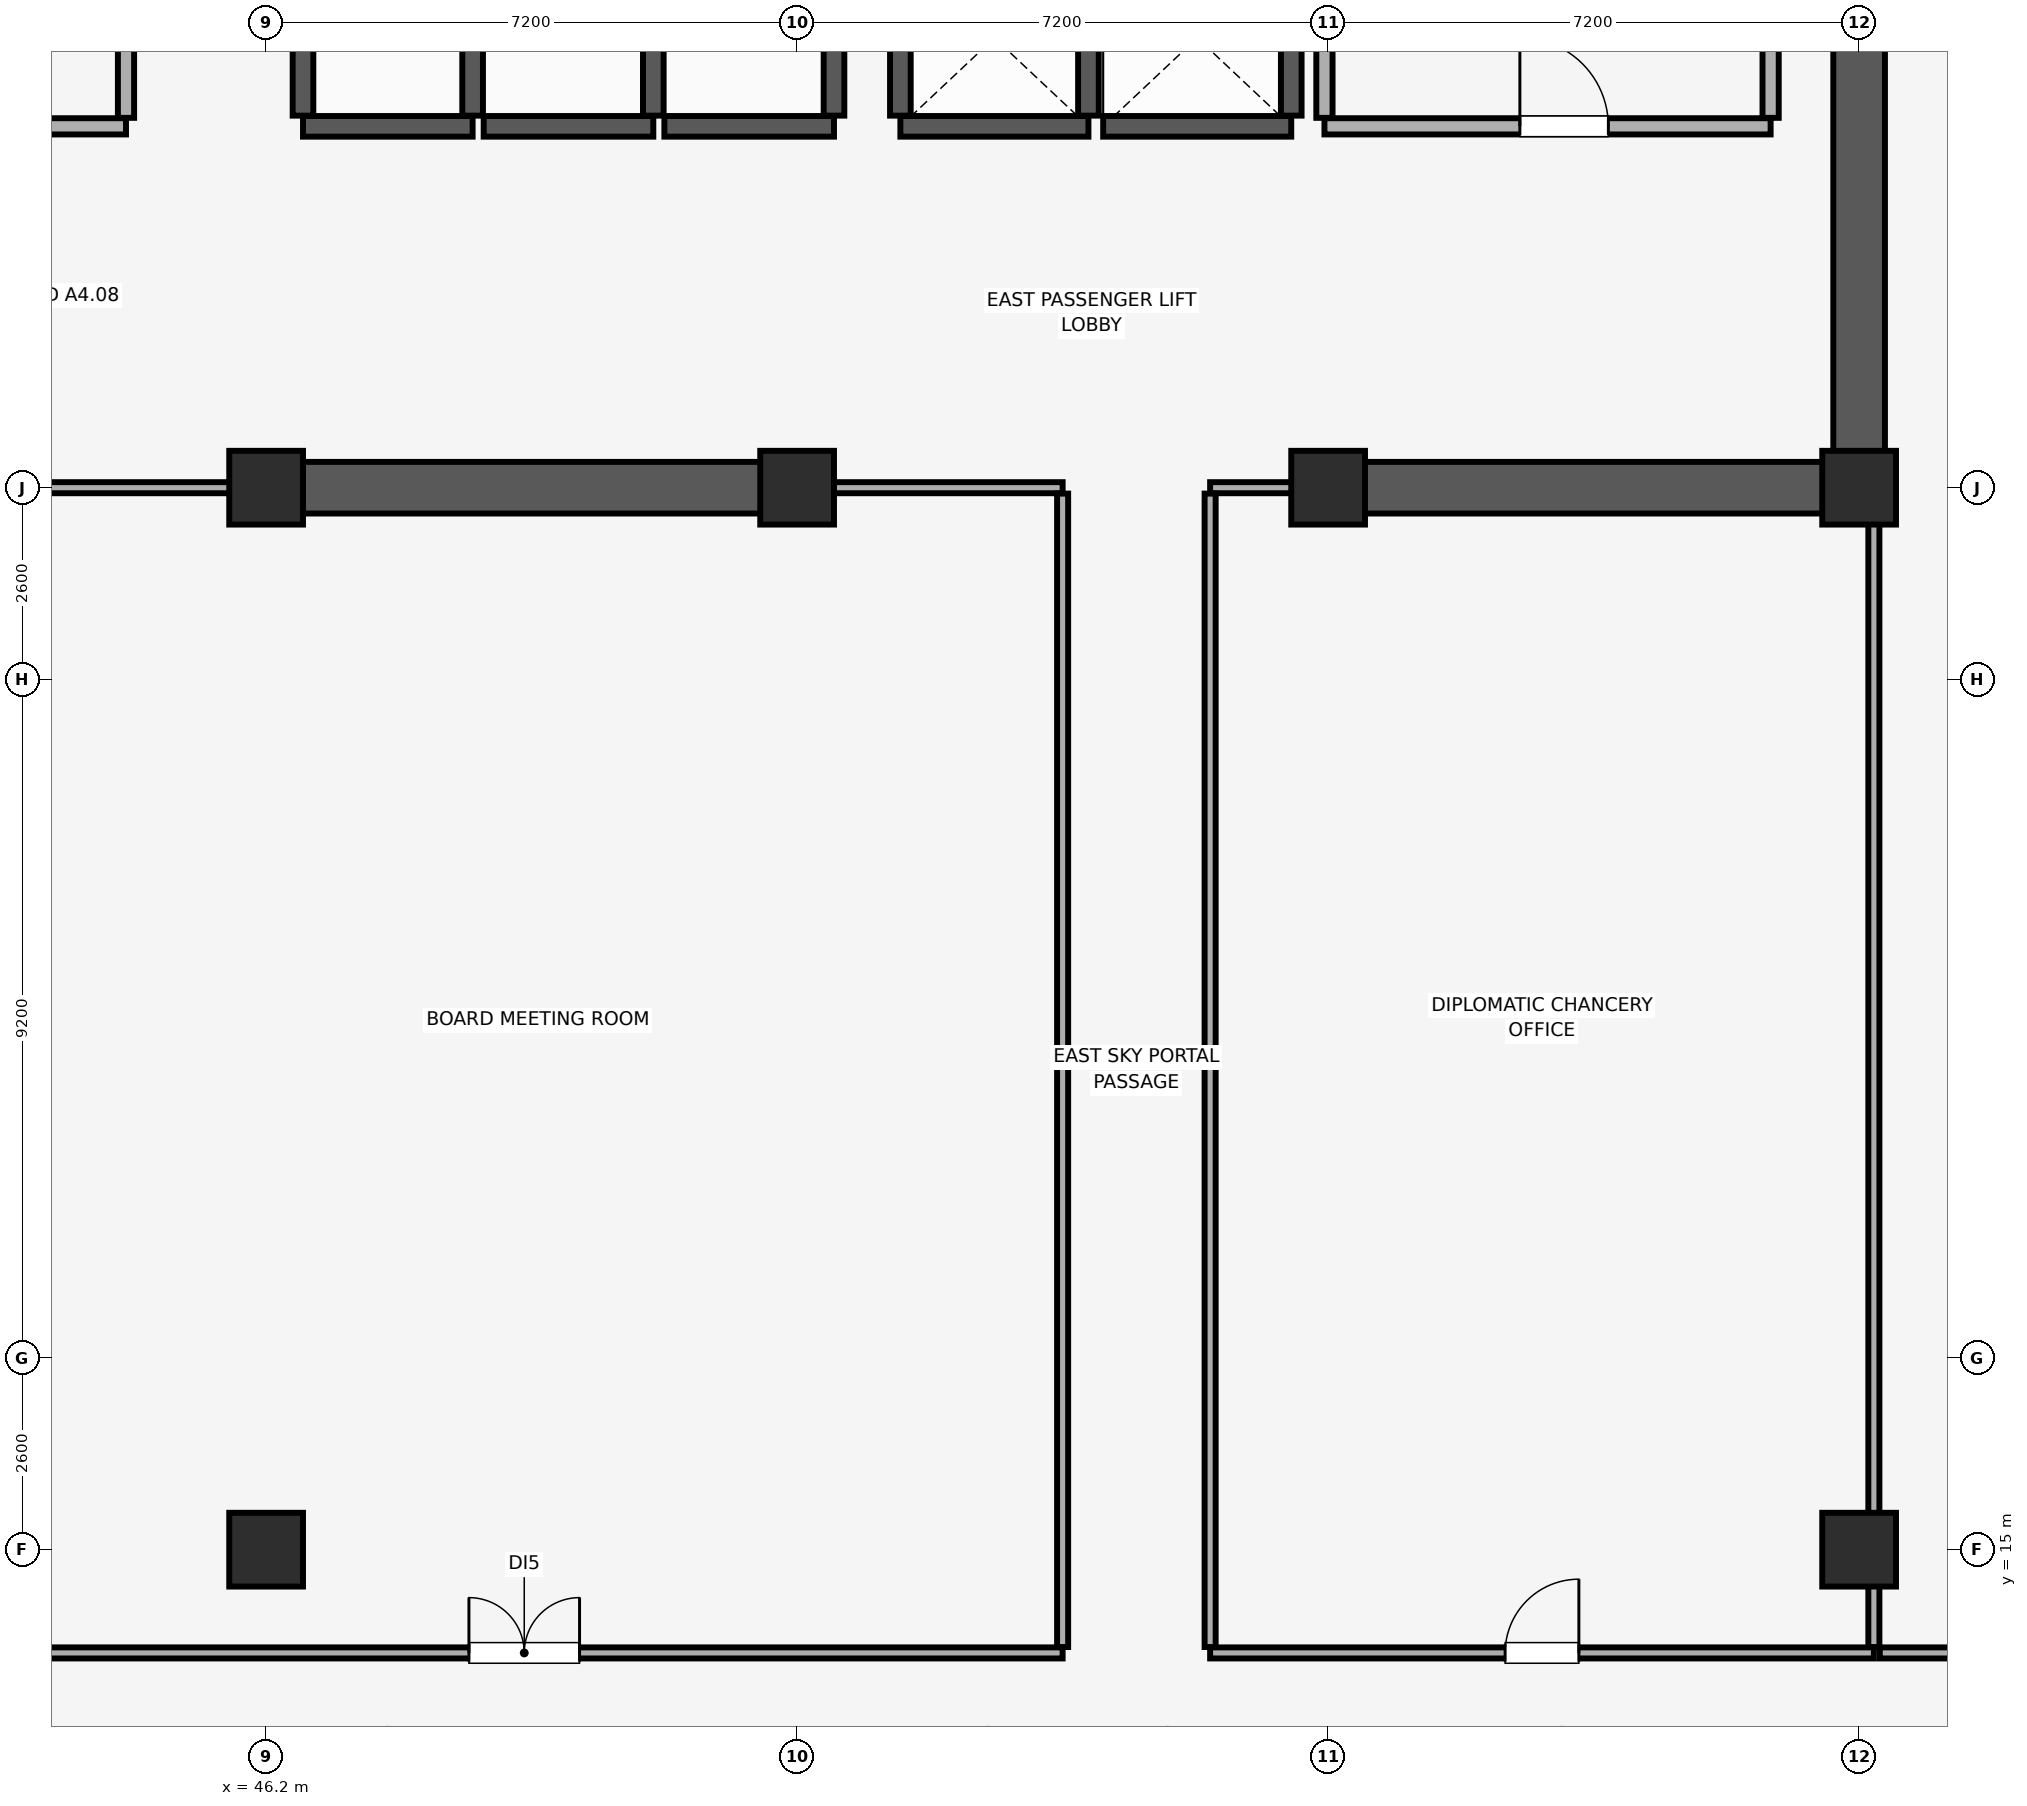
"""IFC4 building model, lengths in metres.
Left out: names, types, materials, properties, quantities, classifications, styles, units other than length and angle.
Written with IfcOpenShell. Run it as: python <this file> out.ifc"""

import sys

from ifc_helpers import new_model, si_unit, direction, frame, frame_2d, origin, origin_2d, place, context, subcontext, project, spatial, rectangle, extrude, element, fill, save


model = new_model("IFC4")
c1 = context("Model", 3, precision=1e-05, world=origin(), true_north=direction((0.0, 1.0)))
c2 = subcontext(c1, "Body", "Model", "MODEL_VIEW")
j1 = project(units=[si_unit("LENGTHUNIT", "METRE"), si_unit("PLANEANGLEUNIT", "RADIAN")], contexts=[c1])
p1 = place(None, origin())
s1 = spatial("IfcSite", under=j1, at=p1, CompositionType="ELEMENT")
p2 = place(p1, origin())
s2 = spatial("IfcBuilding", under=s1, at=p2, CompositionType="ELEMENT")
p3 = place(p2, frame((0.0, 0.0, 229.15)))
s3 = spatial("IfcBuildingStorey", under=s2, at=p3, CompositionType="ELEMENT", Elevation=229.15)
for number, where, z_axis, x_axis in (
    (1, (46.2, 15.0, 0.0), (0.0, 0.0, 1.0), (1.0, 0.0, 0.0)),
    (2, (67.8, 15.0, 0.0), (0.0, 0.0, 1.0), (1.0, 0.0, 0.0)),
    (3, (46.2, 29.4, 0.0), (0.0, 0.0, 1.0), (1.0, 0.0, 0.0)),
    (4, (53.4, 29.4, 0.0), (0.0, 0.0, 1.0), (1.0, 0.0, 0.0)),
    (5, (60.6, 29.4, 0.0), (0.0, 0.0, 1.0), (1.0, 0.0, 0.0)),
    (6, (67.8, 29.4, 0.0), (0.0, 0.0, 1.0), (1.0, 0.0, 0.0)),
):
    element("IfcColumn", number, at=place(p3, frame(where, z_axis=z_axis, x_axis=x_axis)), inside=s3, PredefinedType="COLUMN", context=c2, shape_type="SweptSolid", body=[
        extrude(rectangle(XDim=1.0, YDim=1.0, at=origin_2d()), origin(), (0.0, 0.0, 1.0), 3.71),
    ])
p4 = place(p3, frame((67.8, 29.4, 0.0), z_axis=(0.0, 0.0, 1.0), x_axis=(0.0, 1.0, 0.0)))
e7 = element("IfcWall", 7, at=p4, inside=s3, PredefinedType="SHEAR", context=c2, shape_type="SweptSolid", body=[
    extrude(rectangle(XDim=19.2, YDim=0.7, at=frame_2d((9.6, 0.0))), origin(), (0.0, 0.0, 1.0), 3.71),
])
p5 = place(p3, frame((46.0, 29.4, 0.0), z_axis=(0.0, 0.0, 1.0), x_axis=(1.0, 0.0, 0.0)))
e8 = element("IfcWall", 8, at=p5, inside=s3, PredefinedType="SHEAR", context=c2, shape_type="SweptSolid", body=[
    extrude(rectangle(XDim=7.6, YDim=0.7, at=frame_2d((3.8, 0.0))), origin(), (0.0, 0.0, 1.0), 3.71),
])
p6 = place(p3, frame((60.4, 29.4, 0.0), z_axis=(0.0, 0.0, 1.0), x_axis=(1.0, 0.0, 0.0)))
e9 = element("IfcWall", 9, at=p6, inside=s3, PredefinedType="SHEAR", context=c2, shape_type="SweptSolid", body=[
    extrude(rectangle(XDim=7.045, YDim=0.7, at=frame_2d((3.522, 0.0))), origin(), (0.0, 0.0, 1.0), 3.71),
])
p7 = place(p3, frame((46.7, 34.3, 0.0), z_axis=(0.0, 0.0, 1.0), x_axis=(1.0, 0.0, 0.0)))
e10 = element("IfcWall", 10, at=p7, inside=s3, PredefinedType="SHEAR", context=c2, shape_type="SweptSolid", body=[
    extrude(rectangle(XDim=2.3, YDim=0.28, at=frame_2d((1.15, 0.0))), origin(), (0.0, 0.0, 1.0), 3.71),
])
for number, where, z_axis, x_axis in (
    (11, (46.7, 34.445, 0.0), (0.0, 0.0, 1.0), (0.0, 1.0, 0.0)),
    (12, (49.0, 34.445, 0.0), (0.0, 0.0, 1.0), (0.0, 1.0, 0.0)),
):
    element("IfcWall", number, at=place(p3, frame(where, z_axis=z_axis, x_axis=x_axis)), inside=s3, PredefinedType="SHEAR", context=c2, shape_type="SweptSolid", body=[
        extrude(rectangle(XDim=2.01, YDim=0.28, at=frame_2d((1.005, 0.0))), origin(), (0.0, 0.0, 1.0), 3.71),
    ])
p8 = place(p3, frame((49.15, 34.3, 0.0), z_axis=(0.0, 0.0, 1.0), x_axis=(1.0, 0.0, 0.0)))
e13 = element("IfcWall", 13, at=p8, inside=s3, PredefinedType="SHEAR", context=c2, shape_type="SweptSolid", body=[
    extrude(rectangle(XDim=2.3, YDim=0.28, at=frame_2d((1.15, 0.0))), origin(), (0.0, 0.0, 1.0), 3.71),
])
p9 = place(p3, frame((51.45, 34.445, 0.0), z_axis=(0.0, 0.0, 1.0), x_axis=(0.0, 1.0, 0.0)))
e14 = element("IfcWall", 14, at=p9, inside=s3, PredefinedType="SHEAR", context=c2, shape_type="SweptSolid", body=[
    extrude(rectangle(XDim=2.01, YDim=0.28, at=frame_2d((1.005, 0.0))), origin(), (0.0, 0.0, 1.0), 3.71),
])
p10 = place(p3, frame((51.6, 34.3, 0.0), z_axis=(0.0, 0.0, 1.0), x_axis=(1.0, 0.0, 0.0)))
e15 = element("IfcWall", 15, at=p10, inside=s3, PredefinedType="SHEAR", context=c2, shape_type="SweptSolid", body=[
    extrude(rectangle(XDim=2.3, YDim=0.28, at=frame_2d((1.15, 0.0))), origin(), (0.0, 0.0, 1.0), 3.71),
])
p11 = place(p3, frame((53.9, 34.445, 0.0), z_axis=(0.0, 0.0, 1.0), x_axis=(0.0, 1.0, 0.0)))
e16 = element("IfcWall", 16, at=p11, inside=s3, PredefinedType="SHEAR", context=c2, shape_type="SweptSolid", body=[
    extrude(rectangle(XDim=2.01, YDim=0.28, at=frame_2d((1.005, 0.0))), origin(), (0.0, 0.0, 1.0), 3.71),
])
p12 = place(p3, frame((54.8, 34.3, 0.0), z_axis=(0.0, 0.0, 1.0), x_axis=(1.0, 0.0, 0.0)))
e17 = element("IfcWall", 17, at=p12, inside=s3, PredefinedType="SHEAR", context=c2, shape_type="SweptSolid", body=[
    extrude(rectangle(XDim=2.55, YDim=0.28, at=frame_2d((1.275, 0.0))), origin(), (0.0, 0.0, 1.0), 3.71),
])
for number, where, z_axis, x_axis in (
    (18, (54.8, 34.445, 0.0), (0.0, 0.0, 1.0), (0.0, 1.0, 0.0)),
    (19, (57.35, 34.445, 0.0), (0.0, 0.0, 1.0), (0.0, 1.0, 0.0)),
):
    element("IfcWall", number, at=place(p3, frame(where, z_axis=z_axis, x_axis=x_axis)), inside=s3, PredefinedType="SHEAR", context=c2, shape_type="SweptSolid", body=[
        extrude(rectangle(XDim=2.11, YDim=0.28, at=frame_2d((1.055, 0.0))), origin(), (0.0, 0.0, 1.0), 3.71),
    ])
p13 = place(p3, frame((57.55, 34.3, 0.0), z_axis=(0.0, 0.0, 1.0), x_axis=(1.0, 0.0, 0.0)))
e20 = element("IfcWall", 20, at=p13, inside=s3, PredefinedType="SHEAR", context=c2, shape_type="SweptSolid", body=[
    extrude(rectangle(XDim=2.55, YDim=0.28, at=frame_2d((1.275, 0.0))), origin(), (0.0, 0.0, 1.0), 3.71),
])
p14 = place(p3, frame((60.1, 34.445, 0.0), z_axis=(0.0, 0.0, 1.0), x_axis=(0.0, 1.0, 0.0)))
e21 = element("IfcWall", 21, at=p14, inside=s3, PredefinedType="SHEAR", context=c2, shape_type="SweptSolid", body=[
    extrude(rectangle(XDim=2.11, YDim=0.28, at=frame_2d((1.055, 0.0))), origin(), (0.0, 0.0, 1.0), 3.71),
])
p15 = place(p3, frame((60.55, 34.3, 0.0), z_axis=(0.0, 0.0, 1.0), x_axis=(1.0, 0.0, 0.0)))
e22 = element("IfcWall", 22, at=p15, inside=s3, PredefinedType="PARTITIONING", context=c2, shape_type="SweptSolid", body=[
    extrude(rectangle(XDim=6.05, YDim=0.22, at=frame_2d((3.025, 0.0))), origin(), (0.0, 0.0, 1.0), 3.71),
])
p16 = place(p15, frame((2.65, 0.0, 0.0)))
e23 = element("IfcOpeningElement", 23, at=p16, cuts=e22, PredefinedType="OPENING", context=c2, shape_type="SweptSolid", body=[
    extrude(rectangle(XDim=1.2, YDim=2.15, at=frame_2d((0.6, 1.075))), frame((0.0, 0.12, 0.0), z_axis=(0.0, -1.0, 0.0), x_axis=(1.0, 0.0, 0.0)), (0.0, 0.0, 1.0), 0.24),
])
p17 = place(p3, frame((60.55, 34.415, 0.0), z_axis=(0.0, 0.0, 1.0), x_axis=(0.0, 1.0, 0.0)))
e24 = element("IfcWall", 24, at=p17, inside=s3, PredefinedType="PARTITIONING", context=c2, shape_type="SweptSolid", body=[
    extrude(rectangle(XDim=5.64, YDim=0.22, at=frame_2d((2.82, 0.0))), origin(), (0.0, 0.0, 1.0), 3.71),
])
p18 = place(p3, frame((66.6, 34.415, 0.0), z_axis=(0.0, 0.0, 1.0), x_axis=(0.0, 1.0, 0.0)))
e25 = element("IfcWall", 25, at=p18, inside=s3, PredefinedType="PARTITIONING", context=c2, shape_type="SweptSolid", body=[
    extrude(rectangle(XDim=5.43, YDim=0.22, at=frame_2d((2.715, 0.0))), origin(), (0.0, 0.0, 1.0), 3.71),
])
p19 = place(p3, frame((39.7, 34.3, 0.0), z_axis=(0.0, 0.0, 1.0), x_axis=(1.0, 0.0, 0.0)))
e26 = element("IfcWall", 26, at=p19, inside=s3, PredefinedType="PARTITIONING", context=c2, shape_type="SweptSolid", body=[
    extrude(rectangle(XDim=4.6, YDim=0.22, at=frame_2d((2.3, 0.0))), origin(), (0.0, 0.0, 1.0), 3.71),
])
p20 = place(p19, frame((1.7, 0.0, 0.0)))
e27 = element("IfcOpeningElement", 27, at=p20, cuts=e26, PredefinedType="OPENING", context=c2, shape_type="SweptSolid", body=[
    extrude(rectangle(XDim=1.2, YDim=2.15, at=frame_2d((0.6, 1.075))), frame((0.0, 0.12, 0.0), z_axis=(0.0, -1.0, 0.0), x_axis=(1.0, 0.0, 0.0)), (0.0, 0.0, 1.0), 0.24),
])
p21 = place(p3, frame((44.3, 34.415, 0.0), z_axis=(0.0, 0.0, 1.0), x_axis=(0.0, 1.0, 0.0)))
e28 = element("IfcWall", 28, at=p21, inside=s3, PredefinedType="PARTITIONING", context=c2, shape_type="SweptSolid", body=[
    extrude(rectangle(XDim=5.785, YDim=0.22, at=frame_2d((2.893, 0.0))), origin(), (0.0, 0.0, 1.0), 3.71),
])
p22 = place(p3, frame((42.48, 13.6, 0.0), z_axis=(0.0, 0.0, 1.0), x_axis=(1.0, 0.0, 0.0)))
e29 = element("IfcWall", 29, at=p22, inside=s3, PredefinedType="PARTITIONING", context=c2, shape_type="SweptSolid", body=[
    extrude(rectangle(XDim=14.52, YDim=0.15, at=frame_2d((7.26, 0.0))), origin(), (0.0, 0.0, 1.0), 3.71),
])
p23 = place(p22, frame((6.47, 0.0, 0.0)))
e30 = element("IfcOpeningElement", 30, at=p23, cuts=e29, PredefinedType="OPENING", context=c2, shape_type="SweptSolid", body=[
    extrude(rectangle(XDim=1.5, YDim=2.25, at=frame_2d((0.75, 1.125))), frame((0.0, 0.085, 0.0), z_axis=(0.0, -1.0, 0.0), x_axis=(1.0, 0.0, 0.0)), (0.0, 0.0, 1.0), 0.17),
])
p24 = place(p3, frame((42.48, 29.4, 0.0), z_axis=(0.0, 0.0, 1.0), x_axis=(1.0, 0.0, 0.0)))
e31 = element("IfcWall", 31, at=p24, inside=s3, PredefinedType="PARTITIONING", context=c2, shape_type="SweptSolid", body=[
    extrude(rectangle(XDim=3.51, YDim=0.15, at=frame_2d((1.755, 0.0))), origin(), (0.0, 0.0, 1.0), 2.61),
])
p25 = place(p3, frame((53.61, 29.4, 0.0), z_axis=(0.0, 0.0, 1.0), x_axis=(1.0, 0.0, 0.0)))
e32 = element("IfcWall", 32, at=p25, inside=s3, PredefinedType="PARTITIONING", context=c2, shape_type="SweptSolid", body=[
    extrude(rectangle(XDim=3.39, YDim=0.15, at=frame_2d((1.695, 0.0))), origin(), (0.0, 0.0, 1.0), 2.61),
])
p26 = place(p3, frame((57.0, 13.68, 0.0), z_axis=(0.0, 0.0, 1.0), x_axis=(0.0, 1.0, 0.0)))
e33 = element("IfcWall", 33, at=p26, inside=s3, PredefinedType="PARTITIONING", context=c2, shape_type="SweptSolid", body=[
    extrude(rectangle(XDim=15.64, YDim=0.15, at=frame_2d((7.82, 0.0))), origin(), (0.0, 0.0, 1.0), 3.26),
])
p27 = place(p3, frame((59.0, 13.6, 0.0), z_axis=(0.0, 0.0, 1.0), x_axis=(1.0, 0.0, 0.0)))
e34 = element("IfcWall", 34, at=p27, inside=s3, PredefinedType="PARTITIONING", context=c2, shape_type="SweptSolid", body=[
    extrude(rectangle(XDim=9.0, YDim=0.15, at=frame_2d((4.5, 0.0))), origin(), (0.0, 0.0, 1.0), 3.71),
])
p28 = place(p27, frame((4.0, 0.0, 0.0)))
e35 = element("IfcOpeningElement", 35, at=p28, cuts=e34, PredefinedType="OPENING", context=c2, shape_type="SweptSolid", body=[
    extrude(rectangle(XDim=1.0, YDim=2.15, at=frame_2d((0.5, 1.075))), frame((0.0, 0.085, 0.0), z_axis=(0.0, -1.0, 0.0), x_axis=(1.0, 0.0, 0.0)), (0.0, 0.0, 1.0), 0.17),
])
p29 = place(p3, frame((59.0, 29.4, 0.0), z_axis=(0.0, 0.0, 1.0), x_axis=(1.0, 0.0, 0.0)))
e36 = element("IfcWall", 36, at=p29, inside=s3, PredefinedType="PARTITIONING", context=c2, shape_type="SweptSolid", body=[
    extrude(rectangle(XDim=1.39, YDim=0.15, at=frame_2d((0.695, 0.0))), origin(), (0.0, 0.0, 1.0), 2.61),
])
p30 = place(p3, frame((59.0, 13.68, 0.0), z_axis=(0.0, 0.0, 1.0), x_axis=(0.0, 1.0, 0.0)))
e37 = element("IfcWall", 37, at=p30, inside=s3, PredefinedType="PARTITIONING", context=c2, shape_type="SweptSolid", body=[
    extrude(rectangle(XDim=15.64, YDim=0.15, at=frame_2d((7.82, 0.0))), origin(), (0.0, 0.0, 1.0), 3.08),
])
p31 = place(p3, frame((68.0, 13.68, 0.0), z_axis=(0.0, 0.0, 1.0), x_axis=(0.0, 1.0, 0.0)))
e38 = element("IfcWall", 38, at=p31, inside=s3, PredefinedType="PARTITIONING", context=c2, shape_type="SweptSolid", body=[
    extrude(rectangle(XDim=15.71, YDim=0.15, at=frame_2d((7.855, 0.0))), origin(), (0.0, 0.0, 1.0), 3.26),
])
p32 = place(p3, frame((68.08, 13.6, 0.0), z_axis=(0.0, 0.0, 1.0), x_axis=(1.0, 0.0, 0.0)))
e39 = element("IfcWall", 39, at=p32, inside=s3, PredefinedType="PARTITIONING", context=c2, shape_type="SweptSolid", body=[
    extrude(rectangle(XDim=9.77, YDim=0.15, at=frame_2d((4.885, 0.0))), origin(), (0.0, 0.0, 1.0), 3.71),
])
p33 = place(p32, frame((2.14, 0.0, 0.0)))
e40 = element("IfcOpeningElement", 40, at=p33, cuts=e39, PredefinedType="OPENING", context=c2, shape_type="SweptSolid", body=[
    extrude(rectangle(XDim=1.5, YDim=2.25, at=frame_2d((0.75, 1.125))), frame((0.0, 0.085, 0.0), z_axis=(0.0, -1.0, 0.0), x_axis=(1.0, 0.0, 0.0)), (0.0, 0.0, 1.0), 0.17),
])
p34 = place(p16, origin())
e41 = element("IfcDoor", 41, at=p34, inside=s3, OperationType="SINGLE_SWING_LEFT", PredefinedType="DOOR", context=c2, shape_type="SweptSolid", body=[
    extrude(rectangle(XDim=1.2, YDim=2.15, at=frame_2d((0.6, 1.075))), frame((0.0, 0.025, 0.0), z_axis=(0.0, -1.0, 0.0), x_axis=(1.0, 0.0, 0.0)), (0.0, 0.0, 1.0), 0.05),
])
fill(e23, e41)
p35 = place(p23, origin())
e42 = element("IfcDoor", 42, at=p35, inside=s3, OperationType="DOUBLE_DOOR_SINGLE_SWING", PredefinedType="DOOR", context=c2, shape_type="SweptSolid", body=[
    extrude(rectangle(XDim=1.5, YDim=2.25, at=frame_2d((0.75, 1.125))), frame((0.0, 0.025, 0.0), z_axis=(0.0, -1.0, 0.0), x_axis=(1.0, 0.0, 0.0)), (0.0, 0.0, 1.0), 0.05),
])
fill(e30, e42)
p36 = place(p28, origin())
e43 = element("IfcDoor", 43, at=p36, inside=s3, OperationType="SINGLE_SWING_RIGHT", PredefinedType="DOOR", context=c2, shape_type="SweptSolid", body=[
    extrude(rectangle(XDim=1.0, YDim=2.15, at=frame_2d((0.5, 1.075))), frame((0.0, 0.025, 0.0), z_axis=(0.0, -1.0, 0.0), x_axis=(1.0, 0.0, 0.0)), (0.0, 0.0, 1.0), 0.05),
])
fill(e35, e43)
save(model, sys.argv[1])
